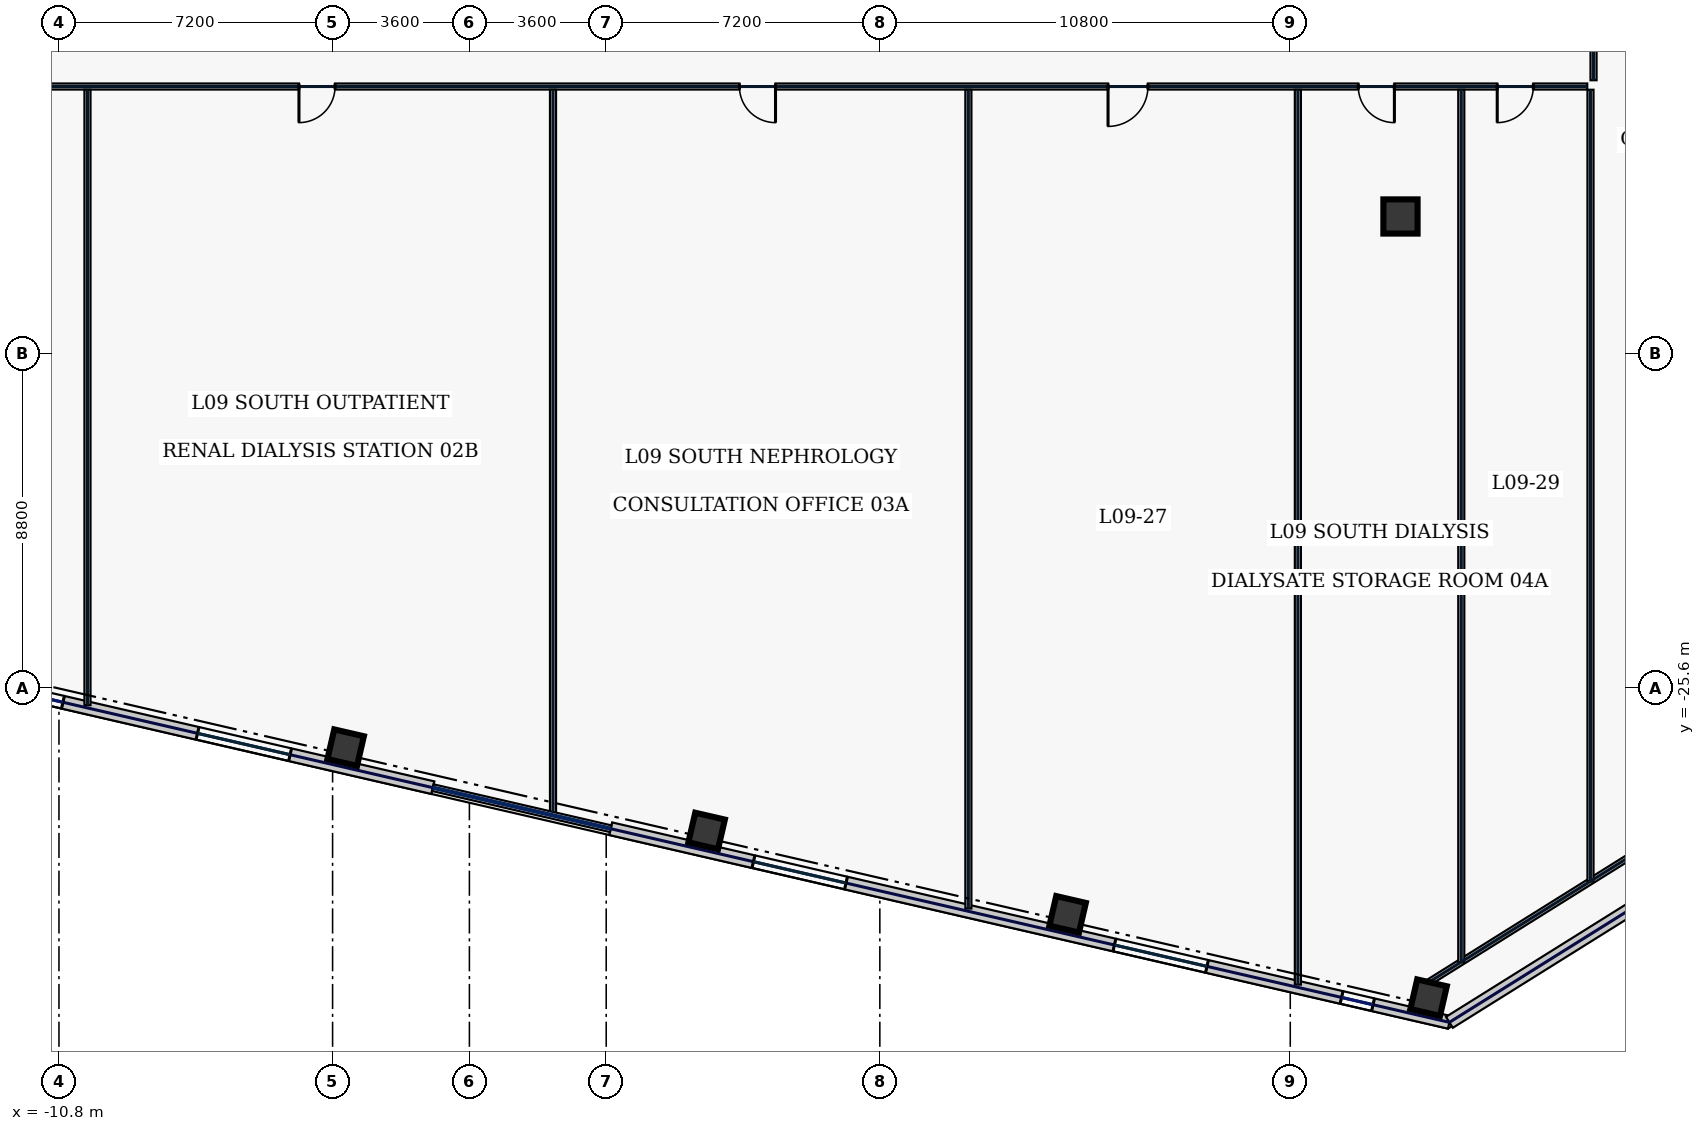
"""IFC4 building model, lengths in metres.
Left out: names, types, materials, properties, quantities, classifications, styles, units other than length and angle.
Written with IfcOpenShell. Run it as: python <this file> out.ifc"""

import sys

from ifc_helpers import new_model, si_unit, direction, frame, frame_2d, origin, origin_2d, place, context, subcontext, project, spatial, rectangle, hollow_rectangle, extrude, element, fill, save


model = new_model("IFC4")
c1 = context("Model", 3, precision=1e-05, world=origin(), true_north=direction((0.0, 1.0)))
c2 = subcontext(c1, "Body", "Model", "MODEL_VIEW")
j1 = project(units=[si_unit("LENGTHUNIT", "METRE"), si_unit("PLANEANGLEUNIT", "RADIAN")], contexts=[c1])
p1 = place(None, origin())
s1 = spatial("IfcSite", under=j1, at=p1, CompositionType="ELEMENT")
p2 = place(p1, origin())
s2 = spatial("IfcBuilding", under=s1, at=p2, CompositionType="ELEMENT")
p3 = place(p2, frame((0.0, 0.0, 47.4)))
s3 = spatial("IfcBuildingStorey", under=s2, at=p3, CompositionType="ELEMENT", Elevation=47.4)
p4 = place(p3, frame((24.5, -13.2, 0.0), z_axis=(0.0, 0.0, 1.0), x_axis=(1.0, 0.0, 0.0)))
e1 = element("IfcColumn", 1, at=p4, inside=s3, PredefinedType="COLUMN", context=c2, shape_type="SweptSolid", body=[
    extrude(hollow_rectangle(XDim=0.9, YDim=0.9, WallThickness=0.04, at=origin_2d()), origin(), (0.0, 0.0, 1.0), 3.74),
])
for number, where, z_axis, x_axis in (
    (2, (-3.256, -27.178, 0.0), (0.0, 0.0, 1.0), (0.974, -0.225, 0.0)),
    (3, (6.242, -29.371, 0.0), (0.0, 0.0, 1.0), (0.974, -0.225, 0.0)),
    (4, (15.741, -31.564, 0.0), (0.0, 0.0, 1.0), (0.974, -0.225, 0.0)),
    (5, (25.24, -33.757, 0.0), (0.0, 0.0, 1.0), (0.974, -0.225, 0.0)),
):
    element("IfcColumn", number, at=place(p3, frame(where, z_axis=z_axis, x_axis=x_axis)), inside=s3, PredefinedType="COLUMN", context=c2, shape_type="SweptSolid", body=[
        extrude(hollow_rectangle(XDim=0.8, YDim=0.8, WallThickness=0.036, at=origin_2d()), origin(), (0.0, 0.0, 1.0), 3.74),
    ])
p5 = place(p3, frame((-14.892, -25.015, 0.0), z_axis=(0.0, 0.0, 1.0), x_axis=(0.974372775, -0.224939314791, 0.0)))
e6 = element("IfcWall", 6, at=p5, inside=s3, PredefinedType="STANDARD", context=c2, shape_type="SweptSolid", body=[
    extrude(rectangle(XDim=14.299, YDim=0.34, at=frame_2d((7.149, 0.0))), origin(), (0.0, 0.0, 1.0), 3.74),
])
p6 = place(p5, frame((3.458, 0.0, 0.72)))
e7 = element("IfcOpeningElement", 7, at=p6, cuts=e6, PredefinedType="OPENING", context=c2, shape_type="SweptSolid", body=[
    extrude(rectangle(XDim=0.85, YDim=1.85, at=frame_2d((0.425, 0.925))), frame((0.0, 0.18, 0.0), z_axis=(0.0, -1.0, 0.0), x_axis=(1.0, 0.0, 0.0)), (0.0, 0.0, 1.0), 0.36),
])
p7 = place(p5, frame((7.942, 0.0, 0.72)))
e8 = element("IfcOpeningElement", 8, at=p7, cuts=e6, PredefinedType="OPENING", context=c2, shape_type="SweptSolid", body=[
    extrude(rectangle(XDim=2.5, YDim=2.15, at=frame_2d((1.25, 1.075))), frame((0.0, 0.18, 0.0), z_axis=(0.0, -1.0, 0.0), x_axis=(1.0, 0.0, 0.0)), (0.0, 0.0, 1.0), 0.36),
])
p8 = place(p3, frame((3.717, -29.311, 0.0), z_axis=(0.0, 0.0, 1.0), x_axis=(0.97436993772, -0.224951604723, 0.0)))
e9 = element("IfcWall", 9, at=p8, inside=s3, PredefinedType="STANDARD", context=c2, shape_type="SweptSolid", body=[
    extrude(rectangle(XDim=22.651, YDim=0.34, at=frame_2d((11.326, 0.0))), origin(), (0.0, 0.0, 1.0), 3.74),
])
p9 = place(p8, frame((3.856, 0.0, 0.72)))
e10 = element("IfcOpeningElement", 10, at=p9, cuts=e9, PredefinedType="OPENING", context=c2, shape_type="SweptSolid", body=[
    extrude(rectangle(XDim=2.5, YDim=2.15, at=frame_2d((1.25, 1.075))), frame((0.0, 0.18, 0.0), z_axis=(0.0, -1.0, 0.0), x_axis=(1.0, 0.0, 0.0)), (0.0, 0.0, 1.0), 0.36),
])
p10 = place(p8, frame((13.605, 0.0, 0.72)))
e11 = element("IfcOpeningElement", 11, at=p10, cuts=e9, PredefinedType="OPENING", context=c2, shape_type="SweptSolid", body=[
    extrude(rectangle(XDim=2.5, YDim=2.15, at=frame_2d((1.25, 1.075))), frame((0.0, 0.18, 0.0), z_axis=(0.0, -1.0, 0.0), x_axis=(1.0, 0.0, 0.0)), (0.0, 0.0, 1.0), 0.36),
])
p11 = place(p8, frame((19.739, 0.0, 0.72)))
e12 = element("IfcOpeningElement", 12, at=p11, cuts=e9, PredefinedType="OPENING", context=c2, shape_type="SweptSolid", body=[
    extrude(rectangle(XDim=0.85, YDim=1.85, at=frame_2d((0.425, 0.925))), frame((0.0, 0.18, 0.0), z_axis=(0.0, -1.0, 0.0), x_axis=(1.0, 0.0, 0.0)), (0.0, 0.0, 1.0), 0.36),
])
p12 = place(p3, frame((25.788, -34.406, 0.0), z_axis=(0.0, 0.0, 1.0), x_axis=(0.848046504656, 0.529921811158, 0.0)))
e13 = element("IfcWall", 13, at=p12, inside=s3, PredefinedType="STANDARD", context=c2, shape_type="SweptSolid", body=[
    extrude(rectangle(XDim=7.113, YDim=0.34, at=frame_2d((3.557, 0.0))), origin(), (0.0, 0.0, 1.0), 3.74),
])
p13 = place(p3, frame((25.06, -33.468, 0.0), z_axis=(0.0, 0.0, 1.0), x_axis=(0.848043064089, 0.529927317139, 0.0)))
e14 = element("IfcWall", 14, at=p13, inside=s3, PredefinedType="PARTITIONING", context=c2, shape_type="SweptSolid", body=[
    extrude(rectangle(XDim=7.354, YDim=0.16, at=frame_2d((3.677, 0.0))), origin(), (0.0, 0.0, 1.0), 3.74),
])
p14 = place(p3, frame((29.58, 9.665, 0.0), z_axis=(0.0, 0.0, 1.0), x_axis=(0.0, -1.0, 0.0)))
e15 = element("IfcWall", 15, at=p14, inside=s3, PredefinedType="PARTITIONING", context=c2, shape_type="SweptSolid", body=[
    extrude(rectangle(XDim=19.28, YDim=0.16, at=frame_2d((9.64, 0.0))), origin(), (0.0, 0.0, 1.0), 3.74),
])
p15 = place(p14, frame((16.531, 0.0, 0.0)))
e16 = element("IfcOpeningElement", 16, at=p15, cuts=e15, PredefinedType="OPENING", context=c2, shape_type="SweptSolid", body=[
    extrude(rectangle(XDim=0.95, YDim=2.2, at=frame_2d((0.475, 1.1))), frame((0.0, 0.09, 0.0), z_axis=(0.0, -1.0, 0.0), x_axis=(1.0, 0.0, 0.0)), (0.0, 0.0, 1.0), 0.18),
])
p16 = place(p14, frame((11.25, 0.0, 0.0)))
e17 = element("IfcOpeningElement", 17, at=p16, cuts=e15, PredefinedType="OPENING", context=c2, shape_type="SweptSolid", body=[
    extrude(rectangle(XDim=0.95, YDim=2.2, at=frame_2d((0.475, 1.1))), frame((0.0, 0.09, 0.0), z_axis=(0.0, -1.0, 0.0), x_axis=(1.0, 0.0, 0.0)), (0.0, 0.0, 1.0), 0.18),
])
p17 = place(p14, frame((6.05, 0.0, 0.0)))
e18 = element("IfcOpeningElement", 18, at=p17, cuts=e15, PredefinedType="OPENING", context=c2, shape_type="SweptSolid", body=[
    extrude(rectangle(XDim=0.95, YDim=2.2, at=frame_2d((0.475, 1.1))), frame((0.0, 0.09, 0.0), z_axis=(0.0, -1.0, 0.0), x_axis=(1.0, 0.0, 0.0)), (0.0, 0.0, 1.0), 0.18),
])
p18 = place(p14, frame((1.994, 0.0, 0.0)))
e19 = element("IfcOpeningElement", 19, at=p18, cuts=e15, PredefinedType="OPENING", context=c2, shape_type="SweptSolid", body=[
    extrude(rectangle(XDim=0.95, YDim=2.2, at=frame_2d((0.475, 1.1))), frame((0.0, 0.09, 0.0), z_axis=(0.0, -1.0, 0.0), x_axis=(1.0, 0.0, 0.0)), (0.0, 0.0, 1.0), 0.18),
])
p19 = place(p3, frame((29.415, -9.78, 0.0), z_axis=(0.0, 0.0, 1.0), x_axis=(-1.0, 0.0, 0.0)))
e20 = element("IfcWall", 20, at=p19, inside=s3, PredefinedType="PARTITIONING", context=c2, shape_type="SweptSolid", body=[
    extrude(rectangle(XDim=50.65, YDim=0.16, at=frame_2d((25.325, 0.0))), origin(), (0.0, 0.0, 1.0), 3.74),
])
p20 = place(p19, frame((44.516, 0.0, 0.0)))
e21 = element("IfcOpeningElement", 21, at=p20, cuts=e20, PredefinedType="OPENING", context=c2, shape_type="SweptSolid", body=[
    extrude(rectangle(XDim=0.95, YDim=2.2, at=frame_2d((0.475, 1.1))), frame((0.0, 0.09, 0.0), z_axis=(0.0, -1.0, 0.0), x_axis=(1.0, 0.0, 0.0)), (0.0, 0.0, 1.0), 0.18),
])
p21 = place(p19, frame((32.95, 0.0, 0.0)))
e22 = element("IfcOpeningElement", 22, at=p21, cuts=e20, PredefinedType="OPENING", context=c2, shape_type="SweptSolid", body=[
    extrude(rectangle(XDim=0.95, YDim=2.2, at=frame_2d((0.475, 1.1))), frame((0.0, 0.09, 0.0), z_axis=(0.0, -1.0, 0.0), x_axis=(1.0, 0.0, 0.0)), (0.0, 0.0, 1.0), 0.18),
])
p22 = place(p19, frame((21.36, 0.0, 0.0)))
e23 = element("IfcOpeningElement", 23, at=p22, cuts=e20, PredefinedType="OPENING", context=c2, shape_type="SweptSolid", body=[
    extrude(rectangle(XDim=0.95, YDim=2.2, at=frame_2d((0.475, 1.1))), frame((0.0, 0.09, 0.0), z_axis=(0.0, -1.0, 0.0), x_axis=(1.0, 0.0, 0.0)), (0.0, 0.0, 1.0), 0.18),
])
p23 = place(p19, frame((11.56, 0.0, 0.0)))
e24 = element("IfcOpeningElement", 24, at=p23, cuts=e20, PredefinedType="OPENING", context=c2, shape_type="SweptSolid", body=[
    extrude(rectangle(XDim=1.05, YDim=2.2, at=frame_2d((0.525, 1.1))), frame((0.0, 0.09, 0.0), z_axis=(0.0, -1.0, 0.0), x_axis=(1.0, 0.0, 0.0)), (0.0, 0.0, 1.0), 0.18),
])
p24 = place(p19, frame((5.075, 0.0, 0.0)))
e25 = element("IfcOpeningElement", 25, at=p24, cuts=e20, PredefinedType="OPENING", context=c2, shape_type="SweptSolid", body=[
    extrude(rectangle(XDim=0.95, YDim=2.2, at=frame_2d((0.475, 1.1))), frame((0.0, 0.09, 0.0), z_axis=(0.0, -1.0, 0.0), x_axis=(1.0, 0.0, 0.0)), (0.0, 0.0, 1.0), 0.18),
])
p25 = place(p19, frame((1.419, 0.0, 0.0)))
e26 = element("IfcOpeningElement", 26, at=p25, cuts=e20, PredefinedType="OPENING", context=c2, shape_type="SweptSolid", body=[
    extrude(rectangle(XDim=0.95, YDim=2.2, at=frame_2d((0.475, 1.1))), frame((0.0, 0.09, 0.0), z_axis=(0.0, -1.0, 0.0), x_axis=(1.0, 0.0, 0.0)), (0.0, 0.0, 1.0), 0.18),
])
p26 = place(p3, frame((29.5, -30.703, 0.0), z_axis=(0.0, 0.0, 1.0), x_axis=(0.0, 1.0, 0.0)))
e27 = element("IfcWall", 27, at=p26, inside=s3, PredefinedType="PARTITIONING", context=c2, shape_type="SweptSolid", body=[
    extrude(rectangle(XDim=20.838, YDim=0.16, at=frame_2d((10.419, 0.0))), origin(), (0.0, 0.0, 1.0), 3.74),
])
p27 = place(p3, frame((2.2, -28.889, 0.0), z_axis=(0.0, 0.0, 1.0), x_axis=(0.0, 1.0, 0.0)))
e28 = element("IfcWall", 28, at=p27, inside=s3, PredefinedType="PARTITIONING", context=c2, shape_type="SweptSolid", body=[
    extrude(rectangle(XDim=19.024, YDim=0.16, at=frame_2d((9.512, 0.0))), origin(), (0.0, 0.0, 1.0), 3.74),
])
p28 = place(p3, frame((21.8, -33.414, 0.0), z_axis=(0.0, 0.0, 1.0), x_axis=(0.0, 1.0, 0.0)))
e29 = element("IfcWall", 29, at=p28, inside=s3, PredefinedType="PARTITIONING", context=c2, shape_type="SweptSolid", body=[
    extrude(rectangle(XDim=23.549, YDim=0.16, at=frame_2d((11.774, 0.0))), origin(), (0.0, 0.0, 1.0), 3.74),
])
p29 = place(p3, frame((-10.05, -26.061, 0.0), z_axis=(0.0, 0.0, 1.0), x_axis=(0.0, 1.0, 0.0)))
e30 = element("IfcWall", 30, at=p29, inside=s3, PredefinedType="PARTITIONING", context=c2, shape_type="SweptSolid", body=[
    extrude(rectangle(XDim=16.196, YDim=0.16, at=frame_2d((8.098, 0.0))), origin(), (0.0, 0.0, 1.0), 3.74),
])
p30 = place(p3, frame((13.13, -31.413, 0.0), z_axis=(0.0, 0.0, 1.0), x_axis=(0.0, 1.0, 0.0)))
e31 = element("IfcWall", 31, at=p30, inside=s3, PredefinedType="PARTITIONING", context=c2, shape_type="SweptSolid", body=[
    extrude(rectangle(XDim=21.548, YDim=0.16, at=frame_2d((10.774, 0.0))), origin(), (0.0, 0.0, 1.0), 3.74),
])
p31 = place(p3, frame((26.1, -32.827, 0.0), z_axis=(0.0, 0.0, 1.0), x_axis=(0.0, 1.0, 0.0)))
e32 = element("IfcWall", 32, at=p31, inside=s3, PredefinedType="PARTITIONING", context=c2, shape_type="SweptSolid", body=[
    extrude(rectangle(XDim=22.962, YDim=0.16, at=frame_2d((11.481, 0.0))), origin(), (0.0, 0.0, 1.0), 3.74),
])
p32 = place(p6, origin())
e33 = element("IfcWindow", 33, at=p32, inside=s3, PartitioningType="SINGLE_PANEL", PredefinedType="WINDOW", context=c2, shape_type="SweptSolid", body=[
    extrude(rectangle(XDim=0.85, YDim=1.85, at=frame_2d((0.425, 0.925))), frame((0.0, 0.03, 0.0), z_axis=(0.0, -1.0, 0.0), x_axis=(1.0, 0.0, 0.0)), (0.0, 0.0, 1.0), 0.06),
])
fill(e7, e33)
p33 = place(p7, origin())
e34 = element("IfcWindow", 34, at=p33, inside=s3, PartitioningType="SINGLE_PANEL", PredefinedType="WINDOW", context=c2, shape_type="SweptSolid", body=[
    extrude(rectangle(XDim=2.5, YDim=2.15, at=frame_2d((1.25, 1.075))), frame((0.0, 0.03, 0.0), z_axis=(0.0, -1.0, 0.0), x_axis=(1.0, 0.0, 0.0)), (0.0, 0.0, 1.0), 0.06),
])
fill(e8, e34)
p34 = place(p9, origin())
e35 = element("IfcWindow", 35, at=p34, inside=s3, PartitioningType="SINGLE_PANEL", PredefinedType="WINDOW", context=c2, shape_type="SweptSolid", body=[
    extrude(rectangle(XDim=2.5, YDim=2.15, at=frame_2d((1.25, 1.075))), frame((0.0, 0.03, 0.0), z_axis=(0.0, -1.0, 0.0), x_axis=(1.0, 0.0, 0.0)), (0.0, 0.0, 1.0), 0.06),
])
fill(e10, e35)
p35 = place(p10, origin())
e36 = element("IfcWindow", 36, at=p35, inside=s3, PartitioningType="SINGLE_PANEL", PredefinedType="WINDOW", context=c2, shape_type="SweptSolid", body=[
    extrude(rectangle(XDim=2.5, YDim=2.15, at=frame_2d((1.25, 1.075))), frame((0.0, 0.03, 0.0), z_axis=(0.0, -1.0, 0.0), x_axis=(1.0, 0.0, 0.0)), (0.0, 0.0, 1.0), 0.06),
])
fill(e11, e36)
p36 = place(p11, origin())
e37 = element("IfcWindow", 37, at=p36, inside=s3, PartitioningType="SINGLE_PANEL", PredefinedType="WINDOW", context=c2, shape_type="SweptSolid", body=[
    extrude(rectangle(XDim=0.85, YDim=1.85, at=frame_2d((0.425, 0.925))), frame((0.0, 0.03, 0.0), z_axis=(0.0, -1.0, 0.0), x_axis=(1.0, 0.0, 0.0)), (0.0, 0.0, 1.0), 0.06),
])
fill(e12, e37)
p37 = place(p21, origin())
e38 = element("IfcDoor", 38, at=p37, inside=s3, OperationType="SINGLE_SWING_RIGHT", PredefinedType="DOOR", context=c2, shape_type="SweptSolid", body=[
    extrude(rectangle(XDim=0.95, YDim=2.2, at=frame_2d((0.475, 1.1))), frame((0.0, 0.025, 0.0), z_axis=(0.0, -1.0, 0.0), x_axis=(1.0, 0.0, 0.0)), (0.0, 0.0, 1.0), 0.05),
])
fill(e22, e38)
p38 = place(p22, origin())
e39 = element("IfcDoor", 39, at=p38, inside=s3, OperationType="SINGLE_SWING_LEFT", PredefinedType="DOOR", context=c2, shape_type="SweptSolid", body=[
    extrude(rectangle(XDim=0.95, YDim=2.2, at=frame_2d((0.475, 1.1))), frame((0.0, 0.025, 0.0), z_axis=(0.0, -1.0, 0.0), x_axis=(1.0, 0.0, 0.0)), (0.0, 0.0, 1.0), 0.05),
])
fill(e23, e39)
p39 = place(p23, origin())
e40 = element("IfcDoor", 40, at=p39, inside=s3, OperationType="SINGLE_SWING_RIGHT", PredefinedType="DOOR", context=c2, shape_type="SweptSolid", body=[
    extrude(rectangle(XDim=1.05, YDim=2.2, at=frame_2d((0.525, 1.1))), frame((0.0, 0.025, 0.0), z_axis=(0.0, -1.0, 0.0), x_axis=(1.0, 0.0, 0.0)), (0.0, 0.0, 1.0), 0.05),
])
fill(e24, e40)
p40 = place(p24, origin())
e41 = element("IfcDoor", 41, at=p40, inside=s3, OperationType="SINGLE_SWING_LEFT", PredefinedType="DOOR", context=c2, shape_type="SweptSolid", body=[
    extrude(rectangle(XDim=0.95, YDim=2.2, at=frame_2d((0.475, 1.1))), frame((0.0, 0.025, 0.0), z_axis=(0.0, -1.0, 0.0), x_axis=(1.0, 0.0, 0.0)), (0.0, 0.0, 1.0), 0.05),
])
fill(e25, e41)
p41 = place(p25, origin())
e42 = element("IfcDoor", 42, at=p41, inside=s3, OperationType="SINGLE_SWING_RIGHT", PredefinedType="DOOR", context=c2, shape_type="SweptSolid", body=[
    extrude(rectangle(XDim=0.95, YDim=2.2, at=frame_2d((0.475, 1.1))), frame((0.0, 0.025, 0.0), z_axis=(0.0, -1.0, 0.0), x_axis=(1.0, 0.0, 0.0)), (0.0, 0.0, 1.0), 0.05),
])
fill(e26, e42)
save(model, sys.argv[1])
